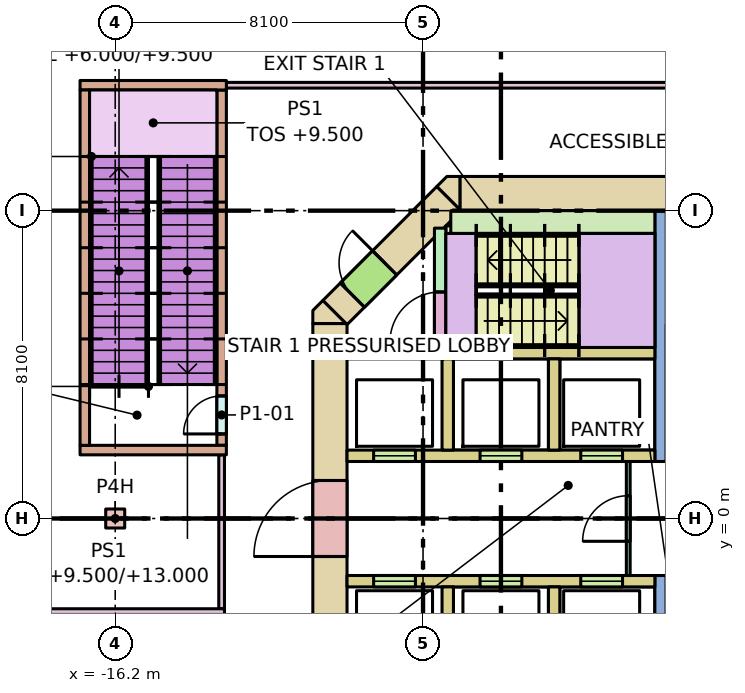
"""IFC4 building model, lengths in metres.
Left out: names, types, materials, properties, quantities, classifications, styles, units other than length and angle.
Written with IfcOpenShell. Run it as: python <this file> out.ifc"""

import sys

from ifc_helpers import new_model, si_unit, direction, frame, frame_2d, origin, origin_2d, place, context, subcontext, project, spatial, polyline, rectangle, outline, extrude, element, fill, save


model = new_model("IFC4")
c1 = context("Model", 3, precision=1e-05, world=origin(), true_north=direction((0.0, 1.0)))
c2 = subcontext(c1, "Body", "Model", "MODEL_VIEW")
j1 = project(units=[si_unit("LENGTHUNIT", "METRE"), si_unit("PLANEANGLEUNIT", "RADIAN")], contexts=[c1])
p1 = place(None, origin())
s1 = spatial("IfcSite", under=j1, at=p1, CompositionType="ELEMENT")
p2 = place(p1, origin())
s2 = spatial("IfcBuilding", under=s1, at=p2, CompositionType="ELEMENT")
p3 = place(p2, frame((0.0, 0.0, 6.0)))
s3 = spatial("IfcBuildingStorey", under=s2, at=p3, CompositionType="ELEMENT", Elevation=6.0)
p4 = place(p3, frame((-16.2, 0.0, 0.0), z_axis=(0.0, 0.0, 1.0), x_axis=(1.0, 0.0, 0.0)))
e1 = element("IfcColumn", 1, at=p4, inside=s3, PredefinedType="COLUMN", context=c2, shape_type="SweptSolid", body=[
    extrude(rectangle(XDim=0.5, YDim=0.5, at=origin_2d()), origin(), (0.0, 0.0, 1.0), 7.0),
])
p5 = place(p3, frame((-7.13, 8.55, -0.32), z_axis=(0.0, 0.0, 1.0), x_axis=(1.0, 0.0, 0.0)))
e2 = element("IfcWall", 2, at=p5, inside=s3, PredefinedType="SHEAR", context=c2, shape_type="SweptSolid", body=[
    extrude(rectangle(XDim=14.26, YDim=0.9, at=frame_2d((7.13, 0.0))), origin(), (0.0, 0.0, 1.0), 7.0),
])
p6 = place(p5, frame((5.48, 0.0, 0.32)))
e3 = element("IfcOpeningElement", 3, at=p6, cuts=e2, PredefinedType="OPENING", context=c2, shape_type="SweptSolid", body=[
    extrude(rectangle(XDim=0.7, YDim=2.1, at=frame_2d((0.35, 1.05))), frame((0.0, 0.46, 0.0), z_axis=(0.0, -1.0, 0.0), x_axis=(1.0, 0.0, 0.0)), (0.0, 0.0, 1.0), 0.92),
])
p7 = place(p5, frame((7.155, 0.0, 0.32)))
e4 = element("IfcOpeningElement", 4, at=p7, cuts=e2, PredefinedType="OPENING", context=c2, shape_type="SweptSolid", body=[
    extrude(rectangle(XDim=0.9, YDim=2.1, at=frame_2d((0.45, 1.05))), frame((0.0, 0.46, 0.0), z_axis=(0.0, -1.0, 0.0), x_axis=(1.0, 0.0, 0.0)), (0.0, 0.0, 1.0), 0.92),
])
p8 = place(p3, frame((-10.55, -5.13, -0.32), z_axis=(0.0, 0.0, 1.0), x_axis=(0.0, 1.0, 0.0)))
e5 = element("IfcWall", 5, at=p8, inside=s3, PredefinedType="SHEAR", context=c2, shape_type="SweptSolid", body=[
    extrude(rectangle(XDim=10.26, YDim=0.9, at=frame_2d((5.13, 0.0))), origin(), (0.0, 0.0, 1.0), 7.0),
])
p9 = place(p8, frame((4.13, 0.0, 0.32)))
e6 = element("IfcOpeningElement", 6, at=p9, cuts=e5, PredefinedType="OPENING", context=c2, shape_type="SweptSolid", body=[
    extrude(rectangle(XDim=2.0, YDim=2.1, at=frame_2d((1.0, 1.05))), frame((0.0, 0.46, 0.0), z_axis=(0.0, -1.0, 0.0), x_axis=(1.0, 0.0, 0.0)), (0.0, 0.0, 1.0), 0.92),
])
p10 = place(p3, frame((-10.418, 5.418, -0.32), z_axis=(0.0, 0.0, 1.0), x_axis=(0.707106781187, 0.707106781187, 0.0)))
e7 = element("IfcWall", 7, at=p10, inside=s3, PredefinedType="SHEAR", context=c2, shape_type="SweptSolid", body=[
    extrude(rectangle(XDim=4.243, YDim=0.9, at=frame_2d((2.121, 0.0))), origin(), (0.0, 0.0, 1.0), 7.0),
])
p11 = place(p10, frame((0.65, 0.0, 0.32)))
e8 = element("IfcOpeningElement", 8, at=p11, cuts=e7, PredefinedType="OPENING", context=c2, shape_type="SweptSolid", body=[
    extrude(rectangle(XDim=1.2, YDim=2.1, at=frame_2d((0.6, 1.05))), frame((0.0, 0.46, 0.0), z_axis=(0.0, -1.0, 0.0), x_axis=(1.0, 0.0, 0.0)), (0.0, 0.0, 1.0), 0.92),
])
p12 = place(p3, frame((0.0, 0.0, -0.32)))
e9 = element("IfcWall", 9, at=p12, inside=s3, PredefinedType="SHEAR", context=c2, shape_type="SweptSolid", body=[
    extrude(outline(polyline([(-10.736, 5.736), (-10.13, 5.13), (-11.0, 5.13), (-11.0, 5.473), (-10.736, 5.736)])), origin(), (0.0, 0.0, 1.0), 7.0),
])
p13 = place(p3, frame((0.0, 0.0, -0.32)))
e10 = element("IfcWall", 10, at=p13, inside=s3, PredefinedType="SHEAR", context=c2, shape_type="SweptSolid", body=[
    extrude(outline(polyline([(-7.473, 9.0), (-7.13, 9.0), (-7.13, 8.13), (-7.736, 8.736), (-7.473, 9.0)])), origin(), (0.0, 0.0, 1.0), 7.0),
])
p14 = place(p3, frame((-10.1, 4.35, 0.0), z_axis=(0.0, 0.0, 1.0), x_axis=(1.0, 0.0, 0.0)))
e11 = element("IfcWall", 11, at=p14, inside=s3, PredefinedType="SOLIDWALL", context=c2, shape_type="SweptSolid", body=[
    extrude(rectangle(XDim=8.1, YDim=0.3, at=frame_2d((4.05, 0.0))), origin(), (0.0, 0.0, 1.0), 6.68),
])
p15 = place(p3, frame((-10.1, 1.65, 0.0), z_axis=(0.0, 0.0, 1.0), x_axis=(1.0, 0.0, 0.0)))
e12 = element("IfcWall", 12, at=p15, inside=s3, PredefinedType="SOLIDWALL", context=c2, shape_type="SweptSolid", body=[
    extrude(rectangle(XDim=8.1, YDim=0.3, at=frame_2d((4.05, 0.0))), origin(), (0.0, 0.0, 1.0), 6.68),
])
p16 = place(p15, frame((0.7, 0.0, 0.0)))
e13 = element("IfcOpeningElement", 13, at=p16, cuts=e12, PredefinedType="OPENING", context=c2, shape_type="SweptSolid", body=[
    extrude(rectangle(XDim=1.1, YDim=2.1, at=frame_2d((0.55, 1.05))), frame((0.0, 0.16, 0.0), z_axis=(0.0, -1.0, 0.0), x_axis=(1.0, 0.0, 0.0)), (0.0, 0.0, 1.0), 0.32),
])
p17 = place(p15, frame((3.5, 0.0, 0.0)))
e14 = element("IfcOpeningElement", 14, at=p17, cuts=e12, PredefinedType="OPENING", context=c2, shape_type="SweptSolid", body=[
    extrude(rectangle(XDim=1.1, YDim=2.1, at=frame_2d((0.55, 1.05))), frame((0.0, 0.16, 0.0), z_axis=(0.0, -1.0, 0.0), x_axis=(1.0, 0.0, 0.0)), (0.0, 0.0, 1.0), 0.32),
])
p18 = place(p15, frame((6.15, 0.0, 0.0)))
e15 = element("IfcOpeningElement", 15, at=p18, cuts=e12, PredefinedType="OPENING", context=c2, shape_type="SweptSolid", body=[
    extrude(rectangle(XDim=1.1, YDim=2.1, at=frame_2d((0.55, 1.05))), frame((0.0, 0.16, 0.0), z_axis=(0.0, -1.0, 0.0), x_axis=(1.0, 0.0, 0.0)), (0.0, 0.0, 1.0), 0.32),
])
p19 = place(p3, frame((-10.1, -1.65, 0.0), z_axis=(0.0, 0.0, 1.0), x_axis=(1.0, 0.0, 0.0)))
e16 = element("IfcWall", 16, at=p19, inside=s3, PredefinedType="SOLIDWALL", context=c2, shape_type="SweptSolid", body=[
    extrude(rectangle(XDim=8.1, YDim=0.3, at=frame_2d((4.05, 0.0))), origin(), (0.0, 0.0, 1.0), 6.68),
])
p20 = place(p19, frame((0.7, 0.0, 0.0)))
e17 = element("IfcOpeningElement", 17, at=p20, cuts=e16, PredefinedType="OPENING", context=c2, shape_type="SweptSolid", body=[
    extrude(rectangle(XDim=1.1, YDim=2.1, at=frame_2d((0.55, 1.05))), frame((0.0, 0.16, 0.0), z_axis=(0.0, -1.0, 0.0), x_axis=(1.0, 0.0, 0.0)), (0.0, 0.0, 1.0), 0.32),
])
p21 = place(p19, frame((3.5, 0.0, 0.0)))
e18 = element("IfcOpeningElement", 18, at=p21, cuts=e16, PredefinedType="OPENING", context=c2, shape_type="SweptSolid", body=[
    extrude(rectangle(XDim=1.1, YDim=2.1, at=frame_2d((0.55, 1.05))), frame((0.0, 0.16, 0.0), z_axis=(0.0, -1.0, 0.0), x_axis=(1.0, 0.0, 0.0)), (0.0, 0.0, 1.0), 0.32),
])
p22 = place(p19, frame((6.15, 0.0, 0.0)))
e19 = element("IfcOpeningElement", 19, at=p22, cuts=e16, PredefinedType="OPENING", context=c2, shape_type="SweptSolid", body=[
    extrude(rectangle(XDim=1.1, YDim=2.1, at=frame_2d((0.55, 1.05))), frame((0.0, 0.16, 0.0), z_axis=(0.0, -1.0, 0.0), x_axis=(1.0, 0.0, 0.0)), (0.0, 0.0, 1.0), 0.32),
])
for number, where, z_axis, x_axis in (
    (20, (-7.45, 1.8, 0.0), (0.0, 0.0, 1.0), (0.0, 1.0, 0.0)),
    (21, (-7.45, -4.2, 0.0), (0.0, 0.0, 1.0), (0.0, 1.0, 0.0)),
    (22, (-4.65, 1.8, 0.0), (0.0, 0.0, 1.0), (0.0, 1.0, 0.0)),
    (23, (-4.65, -4.2, 0.0), (0.0, 0.0, 1.0), (0.0, 1.0, 0.0)),
):
    element("IfcWall", number, at=place(p3, frame(where, z_axis=z_axis, x_axis=x_axis)), inside=s3, PredefinedType="SOLIDWALL", context=c2, shape_type="SweptSolid", body=[
        extrude(rectangle(XDim=2.4, YDim=0.3, at=frame_2d((1.2, 0.0))), origin(), (0.0, 0.0, 1.0), 6.68),
    ])
for number, where, z_axis, x_axis in (
    (24, (-1.85, 1.5, 0.0), (0.0, 0.0, 1.0), (0.0, 1.0, 0.0)),
    (25, (-1.85, -8.1, 0.0), (0.0, 0.0, 1.0), (0.0, 1.0, 0.0)),
):
    element("IfcWall", number, at=place(p3, frame(where, z_axis=z_axis, x_axis=x_axis)), inside=s3, PredefinedType="SHEAR", context=c2, shape_type="SweptSolid", body=[
        extrude(rectangle(XDim=6.6, YDim=0.3, at=frame_2d((3.3, 0.0))), origin(), (0.0, 0.0, 1.0), 6.68),
    ])
p23 = place(p3, frame((-7.65, 4.5, 0.0), z_axis=(0.0, 0.0, 1.0), x_axis=(0.0, 1.0, 0.0)))
e26 = element("IfcWall", 26, at=p23, inside=s3, PredefinedType="SHEAR", context=c2, shape_type="SweptSolid", body=[
    extrude(rectangle(XDim=3.14, YDim=0.3, at=frame_2d((1.57, 0.0))), origin(), (0.0, 0.0, 1.0), 6.68),
])
p24 = place(p23, frame((0.14, 0.0, 0.0)))
e27 = element("IfcOpeningElement", 27, at=p24, cuts=e26, PredefinedType="OPENING", context=c2, shape_type="SweptSolid", body=[
    extrude(rectangle(XDim=1.32, YDim=2.1, at=frame_2d((0.66, 1.05))), frame((0.0, 0.16, 0.0), z_axis=(0.0, -1.0, 0.0), x_axis=(1.0, 0.0, 0.0)), (0.0, 0.0, 1.0), 0.32),
])
p25 = place(p3, frame((-7.37, 7.8, 0.0), z_axis=(0.0, 0.0, 1.0), x_axis=(1.0, 0.0, 0.0)))
e28 = element("IfcWall", 28, at=p25, inside=s3, PredefinedType="SHEAR", context=c2, shape_type="SweptSolid", body=[
    extrude(rectangle(XDim=5.37, YDim=0.6, at=frame_2d((2.685, 0.0))), origin(), (0.0, 0.0, 1.0), 6.68),
])
p26 = place(p3, frame((-7.5, 7.6, 0.0), z_axis=(0.0, 0.0, 1.0), x_axis=(1.0, 0.0, 0.0)))
e29 = element("IfcWall", 29, at=p26, inside=s3, PredefinedType="SHEAR", context=c2, shape_type="SweptSolid", body=[
    extrude(rectangle(XDim=0.6, YDim=0.2, at=frame_2d((0.3, 0.0))), origin(), (0.0, 0.0, 1.0), 6.68),
])
p27 = place(p3, frame((-2.7, -1.5, 0.0), z_axis=(0.0, 0.0, 1.0), x_axis=(0.0, 1.0, 0.0)))
e30 = element("IfcWall", 30, at=p27, inside=s3, PredefinedType="PARTITIONING", context=c2, shape_type="SweptSolid", body=[
    extrude(rectangle(XDim=3.0, YDim=0.1, at=frame_2d((1.5, 0.0))), origin(), (0.0, 0.0, 1.0), 6.68),
])
p28 = place(p27, frame((0.9, 0.0, 0.0)))
e31 = element("IfcOpeningElement", 31, at=p28, cuts=e30, PredefinedType="OPENING", context=c2, shape_type="SweptSolid", body=[
    extrude(rectangle(XDim=1.2, YDim=2.1, at=frame_2d((0.6, 1.05))), frame((0.0, 0.06, 0.0), z_axis=(0.0, -1.0, 0.0), x_axis=(1.0, 0.0, 0.0)), (0.0, 0.0, 1.0), 0.12),
])
p29 = place(p3, frame((-13.4, 1.925, 0.0), z_axis=(0.0, 0.0, 1.0), x_axis=(0.0, 1.0, 0.0)))
e32 = element("IfcWall", 32, at=p29, inside=s3, PredefinedType="STANDARD", context=c2, shape_type="SweptSolid", body=[
    extrude(rectangle(XDim=9.35, YDim=0.25, at=frame_2d((4.675, 0.0))), origin(), (0.0, 0.0, 1.0), 6.68),
])
p30 = place(p29, frame((0.3, 0.0, 0.0)))
e33 = element("IfcOpeningElement", 33, at=p30, cuts=e32, PredefinedType="OPENING", context=c2, shape_type="SweptSolid", body=[
    extrude(rectangle(XDim=1.0, YDim=2.1, at=frame_2d((0.5, 1.05))), frame((0.0, 0.135, 0.0), z_axis=(0.0, -1.0, 0.0), x_axis=(1.0, 0.0, 0.0)), (0.0, 0.0, 1.0), 0.27),
])
for number, where, z_axis, x_axis in (
    (34, (-17.125, 1.8, 0.0), (0.0, 0.0, 1.0), (1.0, 0.0, 0.0)),
    (35, (-17.125, 11.4, 0.0), (0.0, 0.0, 1.0), (1.0, 0.0, 0.0)),
):
    element("IfcWall", number, at=place(p3, frame(where, z_axis=z_axis, x_axis=x_axis)), inside=s3, PredefinedType="STANDARD", context=c2, shape_type="SweptSolid", body=[
        extrude(rectangle(XDim=3.85, YDim=0.25, at=frame_2d((1.925, 0.0))), origin(), (0.0, 0.0, 1.0), 6.68),
    ])
p31 = place(p3, frame((-17.0, 1.925, 0.0), z_axis=(0.0, 0.0, 1.0), x_axis=(0.0, 1.0, 0.0)))
e36 = element("IfcWall", 36, at=p31, inside=s3, PredefinedType="STANDARD", context=c2, shape_type="SweptSolid", body=[
    extrude(rectangle(XDim=9.35, YDim=0.25, at=frame_2d((4.675, 0.0))), origin(), (0.0, 0.0, 1.0), 6.68),
])
p32 = place(p3, frame((-13.275, 11.4, 0.0), z_axis=(0.0, 0.0, 1.0), x_axis=(1.0, 0.0, 0.0)))
e37 = element("IfcWall", 37, at=p32, inside=s3, PredefinedType="PARTITIONING", context=c2, shape_type="SweptSolid", body=[
    extrude(rectangle(XDim=15.8, YDim=0.15, at=frame_2d((7.9, 0.0))), origin(), (0.0, 0.0, 1.0), 6.68),
])
p33 = place(p3, frame((-13.4, -2.375, 0.0), z_axis=(0.0, 0.0, 1.0), x_axis=(0.0, 1.0, 0.0)))
e38 = element("IfcWall", 38, at=p33, inside=s3, PredefinedType="PARTITIONING", context=c2, shape_type="SweptSolid", body=[
    extrude(rectangle(XDim=4.05, YDim=0.15, at=frame_2d((2.025, 0.0))), origin(), (0.0, 0.0, 1.0), 6.68),
])
p34 = place(p3, frame((-23.775, -2.45, 0.0), z_axis=(0.0, 0.0, 1.0), x_axis=(1.0, 0.0, 0.0)))
e39 = element("IfcWall", 39, at=p34, inside=s3, PredefinedType="PARTITIONING", context=c2, shape_type="SweptSolid", body=[
    extrude(rectangle(XDim=10.45, YDim=0.15, at=frame_2d((5.225, 0.0))), origin(), (0.0, 0.0, 1.0), 6.68),
])
p35 = place(p16, origin())
e40 = element("IfcDoor", 40, at=p35, inside=s3, OperationType="DOUBLE_DOOR_SLIDING", PredefinedType="DOOR", context=c2, shape_type="SweptSolid", body=[
    extrude(rectangle(XDim=1.1, YDim=2.1, at=frame_2d((0.55, 1.05))), frame((0.0, 0.025, 0.0), z_axis=(0.0, -1.0, 0.0), x_axis=(1.0, 0.0, 0.0)), (0.0, 0.0, 1.0), 0.05),
])
fill(e13, e40)
p36 = place(p17, origin())
e41 = element("IfcDoor", 41, at=p36, inside=s3, OperationType="DOUBLE_DOOR_SLIDING", PredefinedType="DOOR", context=c2, shape_type="SweptSolid", body=[
    extrude(rectangle(XDim=1.1, YDim=2.1, at=frame_2d((0.55, 1.05))), frame((0.0, 0.025, 0.0), z_axis=(0.0, -1.0, 0.0), x_axis=(1.0, 0.0, 0.0)), (0.0, 0.0, 1.0), 0.05),
])
fill(e14, e41)
p37 = place(p18, origin())
e42 = element("IfcDoor", 42, at=p37, inside=s3, OperationType="DOUBLE_DOOR_SLIDING", PredefinedType="DOOR", context=c2, shape_type="SweptSolid", body=[
    extrude(rectangle(XDim=1.1, YDim=2.1, at=frame_2d((0.55, 1.05))), frame((0.0, 0.025, 0.0), z_axis=(0.0, -1.0, 0.0), x_axis=(1.0, 0.0, 0.0)), (0.0, 0.0, 1.0), 0.05),
])
fill(e15, e42)
p38 = place(p20, origin())
e43 = element("IfcDoor", 43, at=p38, inside=s3, OperationType="DOUBLE_DOOR_SLIDING", PredefinedType="DOOR", context=c2, shape_type="SweptSolid", body=[
    extrude(rectangle(XDim=1.1, YDim=2.1, at=frame_2d((0.55, 1.05))), frame((0.0, 0.025, 0.0), z_axis=(0.0, -1.0, 0.0), x_axis=(1.0, 0.0, 0.0)), (0.0, 0.0, 1.0), 0.05),
])
fill(e17, e43)
p39 = place(p21, origin())
e44 = element("IfcDoor", 44, at=p39, inside=s3, OperationType="DOUBLE_DOOR_SLIDING", PredefinedType="DOOR", context=c2, shape_type="SweptSolid", body=[
    extrude(rectangle(XDim=1.1, YDim=2.1, at=frame_2d((0.55, 1.05))), frame((0.0, 0.025, 0.0), z_axis=(0.0, -1.0, 0.0), x_axis=(1.0, 0.0, 0.0)), (0.0, 0.0, 1.0), 0.05),
])
fill(e18, e44)
p40 = place(p22, origin())
e45 = element("IfcDoor", 45, at=p40, inside=s3, OperationType="DOUBLE_DOOR_SLIDING", PredefinedType="DOOR", context=c2, shape_type="SweptSolid", body=[
    extrude(rectangle(XDim=1.1, YDim=2.1, at=frame_2d((0.55, 1.05))), frame((0.0, 0.025, 0.0), z_axis=(0.0, -1.0, 0.0), x_axis=(1.0, 0.0, 0.0)), (0.0, 0.0, 1.0), 0.05),
])
fill(e19, e45)
p41 = place(p24, origin())
e46 = element("IfcDoor", 46, at=p41, inside=s3, OperationType="DOUBLE_DOOR_SINGLE_SWING", PredefinedType="DOOR", context=c2, shape_type="SweptSolid", body=[
    extrude(rectangle(XDim=1.32, YDim=2.1, at=frame_2d((0.66, 1.05))), frame((0.0, 0.025, 0.0), z_axis=(0.0, -1.0, 0.0), x_axis=(1.0, 0.0, 0.0)), (0.0, 0.0, 1.0), 0.05),
])
fill(e27, e46)
p42 = place(p11, origin())
e47 = element("IfcDoor", 47, at=p42, inside=s3, OperationType="SINGLE_SWING_RIGHT", PredefinedType="DOOR", context=c2, shape_type="SweptSolid", body=[
    extrude(rectangle(XDim=1.2, YDim=2.1, at=frame_2d((0.6, 1.05))), frame((0.0, 0.025, 0.0), z_axis=(0.0, -1.0, 0.0), x_axis=(1.0, 0.0, 0.0)), (0.0, 0.0, 1.0), 0.05),
])
fill(e8, e47)
p43 = place(p9, origin())
e48 = element("IfcDoor", 48, at=p43, inside=s3, OperationType="DOUBLE_DOOR_SINGLE_SWING", PredefinedType="DOOR", context=c2, shape_type="SweptSolid", body=[
    extrude(rectangle(XDim=2.0, YDim=2.1, at=frame_2d((1.0, 1.05))), frame((0.0, 0.025, 0.0), z_axis=(0.0, -1.0, 0.0), x_axis=(1.0, 0.0, 0.0)), (0.0, 0.0, 1.0), 0.05),
])
fill(e6, e48)
p44 = place(p28, origin())
e49 = element("IfcDoor", 49, at=p44, inside=s3, OperationType="SINGLE_SWING_LEFT", PredefinedType="DOOR", context=c2, shape_type="SweptSolid", body=[
    extrude(rectangle(XDim=1.2, YDim=2.1, at=frame_2d((0.6, 1.05))), frame((0.0, 0.025, 0.0), z_axis=(0.0, -1.0, 0.0), x_axis=(1.0, 0.0, 0.0)), (0.0, 0.0, 1.0), 0.05),
])
fill(e31, e49)
p45 = place(p30, origin())
e50 = element("IfcDoor", 50, at=p45, inside=s3, OperationType="SINGLE_SWING_LEFT", PredefinedType="DOOR", context=c2, shape_type="SweptSolid", body=[
    extrude(rectangle(XDim=1.0, YDim=2.1, at=frame_2d((0.5, 1.05))), frame((0.0, 0.025, 0.0), z_axis=(0.0, -1.0, 0.0), x_axis=(1.0, 0.0, 0.0)), (0.0, 0.0, 1.0), 0.05),
])
fill(e33, e50)
save(model, sys.argv[1])
